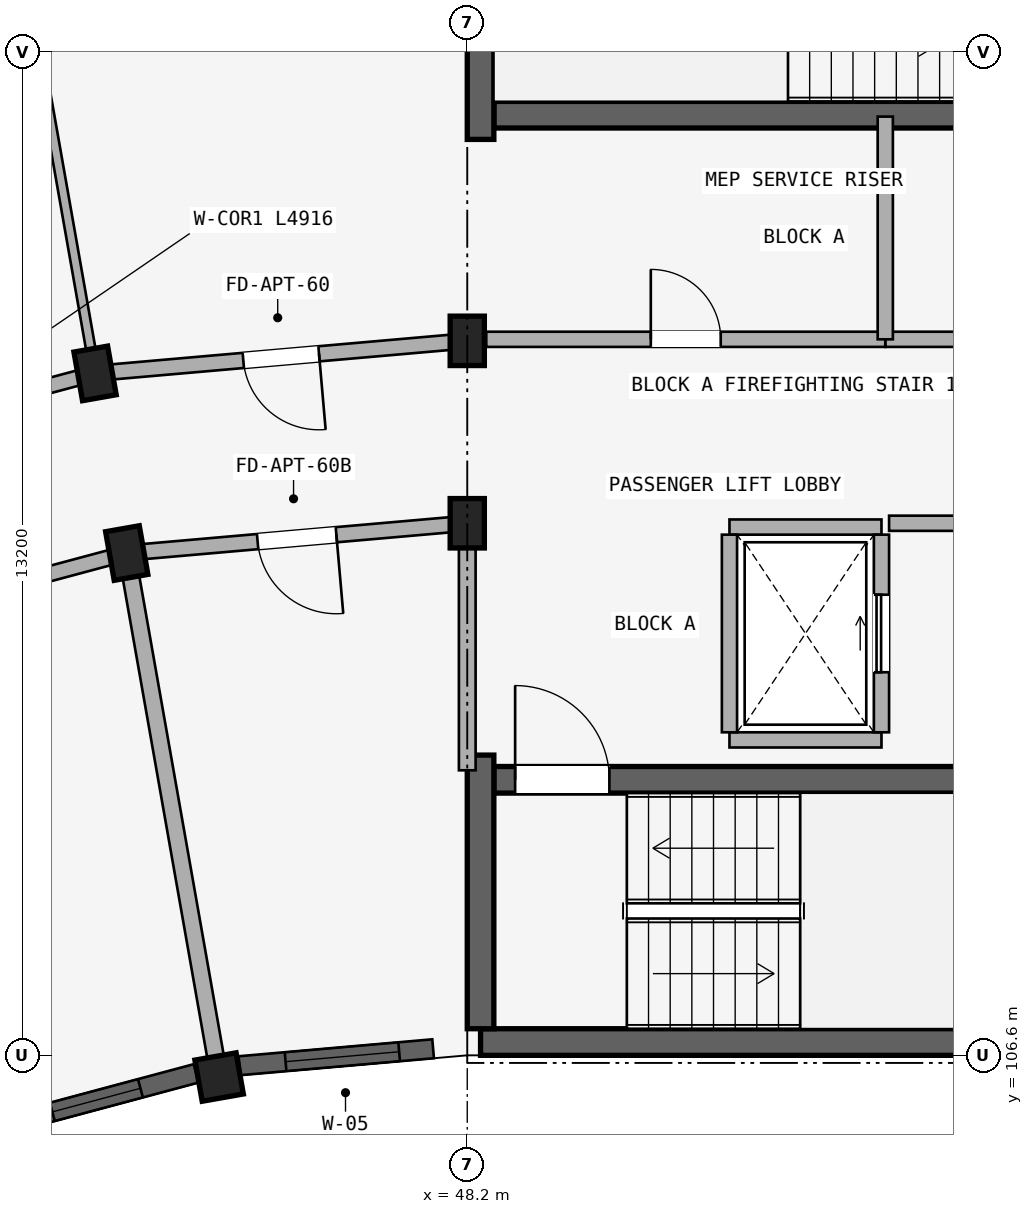
"""IFC4 building model, lengths in metres.
Left out: names, types, materials, properties, quantities, classifications, styles, units other than length and angle.
Written with IfcOpenShell. Run it as: python <this file> out.ifc"""

import sys

from ifc_helpers import new_model, si_unit, direction, frame, frame_2d, origin, origin_2d, place, context, subcontext, project, spatial, rectangle, extrude, element, fill, save


model = new_model("IFC4")
c1 = context("Model", 3, precision=1e-05, world=origin(), true_north=direction((0.0, 1.0)))
c2 = subcontext(c1, "Body", "Model", "MODEL_VIEW")
j1 = project(units=[si_unit("LENGTHUNIT", "METRE"), si_unit("PLANEANGLEUNIT", "RADIAN")], contexts=[c1])
p1 = place(None, origin())
s1 = spatial("IfcSite", under=j1, at=p1, CompositionType="ELEMENT")
p2 = place(p1, origin())
s2 = spatial("IfcBuilding", under=s1, at=p2, CompositionType="ELEMENT")
p3 = place(p2, frame((0.0, 0.0, 33.9)))
s3 = spatial("IfcBuildingStorey", under=s2, at=p3, CompositionType="ELEMENT", Elevation=33.9)
p4 = place(p3, frame((48.55, 118.975, 0.0), z_axis=(0.0, 0.0, 1.0), x_axis=(1.0, 0.0, 0.0)))
e1 = element("IfcWall", 1, at=p4, inside=s3, PredefinedType="SHEAR", context=c2, shape_type="SweptSolid", body=[
    extrude(rectangle(XDim=8.075, YDim=0.35, at=frame_2d((4.038, 0.0))), origin(), (0.0, 0.0, 1.0), 2.93),
])
p5 = place(p4, frame((6.38, 0.0, 0.0)))
e2 = element("IfcOpeningElement", 2, at=p5, cuts=e1, PredefinedType="OPENING", context=c2, shape_type="SweptSolid", body=[
    extrude(rectangle(XDim=1.24, YDim=2.15, at=frame_2d((0.62, 1.075))), frame((0.0, 0.185, 0.0), z_axis=(0.0, -1.0, 0.0), x_axis=(1.0, 0.0, 0.0)), (0.0, 0.0, 1.0), 0.37),
])
p6 = place(p3, frame((48.375, 118.65, 0.0), z_axis=(0.0, 0.0, 1.0), x_axis=(0.0, 1.0, 0.0)))
e3 = element("IfcWall", 3, at=p6, inside=s3, PredefinedType="SHEAR", context=c2, shape_type="SweptSolid", body=[
    extrude(rectangle(XDim=3.6, YDim=0.35, at=frame_2d((1.8, 0.0))), origin(), (0.0, 0.0, 1.0), 2.93),
])
p7 = place(p3, frame((48.375, 106.775, 0.0), z_axis=(0.0, 0.0, 1.0), x_axis=(1.0, 0.0, 0.0)))
e4 = element("IfcWall", 4, at=p7, inside=s3, PredefinedType="SHEAR", context=c2, shape_type="SweptSolid", body=[
    extrude(rectangle(XDim=8.25, YDim=0.35, at=frame_2d((4.125, 0.0))), origin(), (0.0, 0.0, 1.0), 2.93),
])
p8 = place(p3, frame((48.55, 110.225, 0.0), z_axis=(0.0, 0.0, 1.0), x_axis=(1.0, 0.0, 0.0)))
e5 = element("IfcWall", 5, at=p8, inside=s3, PredefinedType="SHEAR", context=c2, shape_type="SweptSolid", body=[
    extrude(rectangle(XDim=7.9, YDim=0.35, at=frame_2d((3.95, 0.0))), origin(), (0.0, 0.0, 1.0), 2.93),
])
p9 = place(p8, frame((0.28, 0.0, 0.0)))
e6 = element("IfcOpeningElement", 6, at=p9, cuts=e5, PredefinedType="OPENING", context=c2, shape_type="SweptSolid", body=[
    extrude(rectangle(XDim=1.24, YDim=2.15, at=frame_2d((0.62, 1.075))), frame((0.0, 0.185, 0.0), z_axis=(0.0, -1.0, 0.0), x_axis=(1.0, 0.0, 0.0)), (0.0, 0.0, 1.0), 0.37),
])
p10 = place(p3, frame((48.375, 106.95, 0.0), z_axis=(0.0, 0.0, 1.0), x_axis=(0.0, 1.0, 0.0)))
e7 = element("IfcWall", 7, at=p10, inside=s3, PredefinedType="SHEAR", context=c2, shape_type="SweptSolid", body=[
    extrude(rectangle(XDim=3.6, YDim=0.35, at=frame_2d((1.8, 0.0))), origin(), (0.0, 0.0, 1.0), 2.93),
])
for number, where, z_axis, x_axis in (
    (8, (48.2, 113.6, 0.0), (0.0, 0.0, 1.0), (1.0, 0.0, 0.0)),
    (9, (48.2, 116.0, 0.0), (0.0, 0.0, 1.0), (1.0, 0.0, 0.0)),
):
    element("IfcColumn", number, at=place(p3, frame(where, z_axis=z_axis, x_axis=x_axis)), inside=s3, PredefinedType="COLUMN", context=c2, shape_type="SweptSolid", body=[
        extrude(rectangle(XDim=0.45, YDim=0.65, at=origin_2d()), origin(), (0.0, 0.0, 1.0), 2.93),
    ])
p11 = place(p3, frame((44.935, 106.314, 0.0), z_axis=(0.0, 0.0, 1.0), x_axis=(0.984807753012, 0.173648177667, 0.0)))
e10 = element("IfcColumn", 10, at=p11, inside=s3, PredefinedType="COLUMN", context=c2, shape_type="SweptSolid", body=[
    extrude(rectangle(XDim=0.55, YDim=0.55, at=origin_2d()), origin(), (0.0, 0.0, 1.0), 2.93),
])
for number, where, z_axis, x_axis in (
    (11, (43.72, 113.208, 0.0), (0.0, 0.0, 1.0), (0.985, 0.174, 0.0)),
    (12, (43.303, 115.572, 0.0), (0.0, 0.0, 1.0), (0.985, 0.174, 0.0)),
):
    element("IfcColumn", number, at=place(p3, frame(where, z_axis=z_axis, x_axis=x_axis)), inside=s3, PredefinedType="COLUMN", context=c2, shape_type="SweptSolid", body=[
        extrude(rectangle(XDim=0.45, YDim=0.65, at=origin_2d()), origin(), (0.0, 0.0, 1.0), 2.93),
    ])
p12 = place(p3, frame((53.7, 116.02, 0.0), z_axis=(0.0, 0.0, 1.0), x_axis=(1.0, 0.0, 0.0)))
e13 = element("IfcWall", 13, at=p12, inside=s3, PredefinedType="STANDARD", context=c2, shape_type="SweptSolid", body=[
    extrude(rectangle(XDim=5.65, YDim=0.2, at=frame_2d((2.825, 0.0))), origin(), (0.0, 0.0, 1.0), 2.372),
])
p13 = place(p12, frame((1.923, 0.0, 0.0)))
e14 = element("IfcOpeningElement", 14, at=p13, cuts=e13, PredefinedType="OPENING", context=c2, shape_type="SweptSolid", body=[
    extrude(rectangle(XDim=1.24, YDim=2.15, at=frame_2d((0.62, 1.075))), frame((0.0, 0.11, 0.0), z_axis=(0.0, -1.0, 0.0), x_axis=(1.0, 0.0, 0.0)), (0.0, 0.0, 1.0), 0.22),
])
p14 = place(p3, frame((48.45, 116.02, 0.0), z_axis=(0.0, 0.0, 1.0), x_axis=(1.0, 0.0, 0.0)))
e15 = element("IfcWall", 15, at=p14, inside=s3, PredefinedType="STANDARD", context=c2, shape_type="SweptSolid", body=[
    extrude(rectangle(XDim=5.25, YDim=0.2, at=frame_2d((2.625, 0.0))), origin(), (0.0, 0.0, 1.0), 2.372),
])
p15 = place(p14, frame((2.165, 0.0, 0.0)))
e16 = element("IfcOpeningElement", 16, at=p15, cuts=e15, PredefinedType="OPENING", context=c2, shape_type="SweptSolid", body=[
    extrude(rectangle(XDim=0.92, YDim=2.1, at=frame_2d((0.46, 1.05))), frame((0.0, 0.11, 0.0), z_axis=(0.0, -1.0, 0.0), x_axis=(1.0, 0.0, 0.0)), (0.0, 0.0, 1.0), 0.22),
])
p16 = place(p3, frame((53.7, 116.02, 0.0), z_axis=(0.0, 0.0, 1.0), x_axis=(0.0, 1.0, 0.0)))
e17 = element("IfcWall", 17, at=p16, inside=s3, PredefinedType="STANDARD", context=c2, shape_type="SweptSolid", body=[
    extrude(rectangle(XDim=2.93, YDim=0.2, at=frame_2d((1.465, 0.0))), origin(), (0.0, 0.0, 1.0), 2.372),
])
p17 = place(p3, frame((51.65, 110.75, 0.0), z_axis=(0.0, 0.0, 1.0), x_axis=(1.0, 0.0, 0.0)))
e18 = element("IfcWall", 18, at=p17, inside=s3, PredefinedType="STANDARD", context=c2, shape_type="SweptSolid", body=[
    extrude(rectangle(XDim=2.0, YDim=0.2, at=frame_2d((1.0, 0.0))), origin(), (0.0, 0.0, 1.0), 2.93),
])
p18 = place(p3, frame((51.65, 113.55, 0.0), z_axis=(0.0, 0.0, 1.0), x_axis=(1.0, 0.0, 0.0)))
e19 = element("IfcWall", 19, at=p18, inside=s3, PredefinedType="STANDARD", context=c2, shape_type="SweptSolid", body=[
    extrude(rectangle(XDim=2.0, YDim=0.2, at=frame_2d((1.0, 0.0))), origin(), (0.0, 0.0, 1.0), 2.372),
])
p19 = place(p3, frame((51.65, 110.85, 0.0), z_axis=(0.0, 0.0, 1.0), x_axis=(0.0, 1.0, 0.0)))
e20 = element("IfcWall", 20, at=p19, inside=s3, PredefinedType="STANDARD", context=c2, shape_type="SweptSolid", body=[
    extrude(rectangle(XDim=2.6, YDim=0.2, at=frame_2d((1.3, 0.0))), origin(), (0.0, 0.0, 1.0), 2.372),
])
p20 = place(p3, frame((53.65, 110.85, 0.0), z_axis=(0.0, 0.0, 1.0), x_axis=(0.0, 1.0, 0.0)))
e21 = element("IfcWall", 21, at=p20, inside=s3, PredefinedType="STANDARD", context=c2, shape_type="SweptSolid", body=[
    extrude(rectangle(XDim=2.6, YDim=0.2, at=frame_2d((1.3, 0.0))), origin(), (0.0, 0.0, 1.0), 2.372),
])
p21 = place(p20, frame((0.79, 0.0, 0.0)))
e22 = element("IfcOpeningElement", 22, at=p21, cuts=e21, PredefinedType="OPENING", context=c2, shape_type="SweptSolid", body=[
    extrude(rectangle(XDim=1.02, YDim=2.15, at=frame_2d((0.51, 1.075))), frame((0.0, 0.11, 0.0), z_axis=(0.0, -1.0, 0.0), x_axis=(1.0, 0.0, 0.0)), (0.0, 0.0, 1.0), 0.22),
])
p22 = place(p3, frame((53.75, 113.6, 0.0), z_axis=(0.0, 0.0, 1.0), x_axis=(1.0, 0.0, 0.0)))
e23 = element("IfcWall", 23, at=p22, inside=s3, PredefinedType="STANDARD", context=c2, shape_type="SweptSolid", body=[
    extrude(rectangle(XDim=5.6, YDim=0.2, at=frame_2d((2.8, 0.0))), origin(), (0.0, 0.0, 1.0), 2.372),
])
p23 = place(p22, frame((1.91, 0.0, 0.0)))
e24 = element("IfcOpeningElement", 24, at=p23, cuts=e23, PredefinedType="OPENING", context=c2, shape_type="SweptSolid", body=[
    extrude(rectangle(XDim=1.22, YDim=2.15, at=frame_2d((0.61, 1.075))), frame((0.0, 0.11, 0.0), z_axis=(0.0, -1.0, 0.0), x_axis=(1.0, 0.0, 0.0)), (0.0, 0.0, 1.0), 0.22),
])
p24 = place(p3, frame((48.2, 113.6, 0.0), z_axis=(0.0, 0.0, 1.0), x_axis=(-0.996191949488, -0.087187153726, 0.0)))
e25 = element("IfcWall", 25, at=p24, inside=s3, PredefinedType="STANDARD", context=c2, shape_type="SweptSolid", body=[
    extrude(rectangle(XDim=4.497, YDim=0.2, at=frame_2d((2.249, 0.0))), origin(), (0.0, 0.0, 1.0), 2.372),
])
p25 = place(p24, frame((1.729, 0.0, 0.0)))
e26 = element("IfcOpeningElement", 26, at=p25, cuts=e25, PredefinedType="OPENING", context=c2, shape_type="SweptSolid", body=[
    extrude(rectangle(XDim=1.04, YDim=2.15, at=frame_2d((0.52, 1.075))), frame((0.0, 0.11, 0.0), z_axis=(0.0, -1.0, 0.0), x_axis=(1.0, 0.0, 0.0)), (0.0, 0.0, 1.0), 0.22),
])
p26 = place(p3, frame((48.2, 116.0, 0.0), z_axis=(0.0, 0.0, 1.0), x_axis=(-0.996193663584, -0.087167566415, 0.0)))
e27 = element("IfcWall", 27, at=p26, inside=s3, PredefinedType="STANDARD", context=c2, shape_type="SweptSolid", body=[
    extrude(rectangle(XDim=4.916, YDim=0.2, at=frame_2d((2.458, 0.0))), origin(), (0.0, 0.0, 1.0), 2.372),
])
p27 = place(p26, frame((1.958, 0.0, 0.0)))
e28 = element("IfcOpeningElement", 28, at=p27, cuts=e27, PredefinedType="OPENING", context=c2, shape_type="SweptSolid", body=[
    extrude(rectangle(XDim=1.0, YDim=2.15, at=frame_2d((0.5, 1.075))), frame((0.0, 0.11, 0.0), z_axis=(0.0, -1.0, 0.0), x_axis=(1.0, 0.0, 0.0)), (0.0, 0.0, 1.0), 0.22),
])
p28 = place(p3, frame((43.72, 113.208, 0.0), z_axis=(0.0, 0.0, 1.0), x_axis=(-0.965934240054, -0.258787642463, 0.0)))
e29 = element("IfcWall", 29, at=p28, inside=s3, PredefinedType="STANDARD", context=c2, shape_type="SweptSolid", body=[
    extrude(rectangle(XDim=4.497, YDim=0.2, at=frame_2d((2.249, 0.0))), origin(), (0.0, 0.0, 1.0), 2.372),
])
p29 = place(p28, frame((1.709, 0.0, 0.0)))
e30 = element("IfcOpeningElement", 30, at=p29, cuts=e29, PredefinedType="OPENING", context=c2, shape_type="SweptSolid", body=[
    extrude(rectangle(XDim=1.08, YDim=2.15, at=frame_2d((0.54, 1.075))), frame((0.0, 0.11, 0.0), z_axis=(0.0, -1.0, 0.0), x_axis=(1.0, 0.0, 0.0)), (0.0, 0.0, 1.0), 0.22),
])
p30 = place(p3, frame((43.303, 115.572, 0.0), z_axis=(0.0, 0.0, 1.0), x_axis=(-0.965930095386, -0.258803112091, 0.0)))
e31 = element("IfcWall", 31, at=p30, inside=s3, PredefinedType="STANDARD", context=c2, shape_type="SweptSolid", body=[
    extrude(rectangle(XDim=4.916, YDim=0.2, at=frame_2d((2.458, 0.0))), origin(), (0.0, 0.0, 1.0), 2.372),
])
p31 = place(p3, frame((48.2, 110.35, 0.0), z_axis=(0.0, 0.0, 1.0), x_axis=(0.0, 1.0, 0.0)))
e32 = element("IfcWall", 32, at=p31, inside=s3, PredefinedType="STANDARD", context=c2, shape_type="SweptSolid", body=[
    extrude(rectangle(XDim=3.2, YDim=0.22, at=frame_2d((1.6, 0.0))), origin(), (0.0, 0.0, 1.0), 2.372),
])
p32 = place(p3, frame((44.901, 106.511, 0.0), z_axis=(0.0, 0.0, 1.0), x_axis=(-0.173647089161, 0.984807944945, 0.0)))
e33 = element("IfcWall", 33, at=p32, inside=s3, PredefinedType="STANDARD", context=c2, shape_type="SweptSolid", body=[
    extrude(rectangle(XDim=6.75, YDim=0.22, at=frame_2d((3.375, 0.0))), origin(), (0.0, 0.0, 1.0), 2.372),
])
p33 = place(p3, frame((43.286, 115.67, 0.0), z_axis=(0.0, 0.0, 1.0), x_axis=(-0.173646216546, 0.984808098809, 0.0)))
e34 = element("IfcWall", 34, at=p33, inside=s3, PredefinedType="PARTITIONING", context=c2, shape_type="SweptSolid", body=[
    extrude(rectangle(XDim=17.42, YDim=0.125, at=frame_2d((8.71, 0.0))), origin(), (0.0, 0.0, 1.0), 2.372),
])
p34 = place(p33, frame((7.5, 0.0, 0.0)))
e35 = element("IfcOpeningElement", 35, at=p34, cuts=e34, PredefinedType="OPENING", context=c2, shape_type="SweptSolid", body=[
    extrude(rectangle(XDim=0.8, YDim=2.1, at=frame_2d((0.4, 1.05))), frame((0.0, 0.073, 0.0), z_axis=(0.0, -1.0, 0.0), x_axis=(1.0, 0.0, 0.0)), (0.0, 0.0, 1.0), 0.145),
])
p35 = place(p3, frame((47.751, 106.686, 0.0), z_axis=(0.0, 0.0, 1.0), x_axis=(-0.996188847542, -0.087222589008, 0.0)))
e36 = element("IfcWall", 36, at=p35, inside=s3, PredefinedType="STANDARD", context=c2, shape_type="SweptSolid", body=[
    extrude(rectangle(XDim=2.558, YDim=0.25, at=frame_2d((1.279, 0.0))), origin(), (0.0, 0.0, 1.0), 2.472),
])
p36 = place(p35, frame((0.448, 0.0, 0.622)))
e37 = element("IfcOpeningElement", 37, at=p36, cuts=e36, PredefinedType="OPENING", context=c2, shape_type="SweptSolid", body=[
    extrude(rectangle(XDim=1.5, YDim=1.65, at=frame_2d((0.75, 0.825))), frame((0.0, 0.135, 0.0), z_axis=(0.0, -1.0, 0.0), x_axis=(1.0, 0.0, 0.0)), (0.0, 0.0, 1.0), 0.27),
])
p37 = place(p3, frame((44.634, 106.363, 0.0), z_axis=(0.0, 0.0, 1.0), x_axis=(-0.965928818058, -0.258807879411, 0.0)))
e38 = element("IfcWall", 38, at=p37, inside=s3, PredefinedType="STANDARD", context=c2, shape_type="SweptSolid", body=[
    extrude(rectangle(XDim=2.72, YDim=0.25, at=frame_2d((1.36, 0.0))), origin(), (0.0, 0.0, 1.0), 2.472),
])
p38 = place(p37, frame((0.76, 0.0, 0.772)))
e39 = element("IfcOpeningElement", 39, at=p38, cuts=e38, PredefinedType="OPENING", context=c2, shape_type="SweptSolid", body=[
    extrude(rectangle(XDim=1.2, YDim=1.5, at=frame_2d((0.6, 0.75))), frame((0.0, 0.135, 0.0), z_axis=(0.0, -1.0, 0.0), x_axis=(1.0, 0.0, 0.0)), (0.0, 0.0, 1.0), 0.27),
])
p39 = place(p36, origin())
e40 = element("IfcWindow", 40, at=p39, inside=s3, PartitioningType="DOUBLE_PANEL_VERTICAL", PredefinedType="WINDOW", context=c2, shape_type="SweptSolid", body=[
    extrude(rectangle(XDim=1.5, YDim=1.65, at=frame_2d((0.75, 0.825))), frame((0.0, 0.03, 0.0), z_axis=(0.0, -1.0, 0.0), x_axis=(1.0, 0.0, 0.0)), (0.0, 0.0, 1.0), 0.06),
])
fill(e37, e40)
p40 = place(p38, origin())
e41 = element("IfcWindow", 41, at=p40, inside=s3, PartitioningType="SINGLE_PANEL", PredefinedType="WINDOW", context=c2, shape_type="SweptSolid", body=[
    extrude(rectangle(XDim=1.2, YDim=1.5, at=frame_2d((0.6, 0.75))), frame((0.0, 0.03, 0.0), z_axis=(0.0, -1.0, 0.0), x_axis=(1.0, 0.0, 0.0)), (0.0, 0.0, 1.0), 0.06),
])
fill(e39, e41)
p41 = place(p15, origin())
e42 = element("IfcDoor", 42, at=p41, inside=s3, OperationType="SINGLE_SWING_LEFT", PredefinedType="DOOR", context=c2, shape_type="SweptSolid", body=[
    extrude(rectangle(XDim=0.92, YDim=2.1, at=frame_2d((0.46, 1.05))), frame((0.0, 0.025, 0.0), z_axis=(0.0, -1.0, 0.0), x_axis=(1.0, 0.0, 0.0)), (0.0, 0.0, 1.0), 0.05),
])
fill(e16, e42)
p42 = place(p9, frame((1.24, 0.0, 0.0), z_axis=(0.0, 0.0, 1.0), x_axis=(-1.0, 0.0, 0.0)))
e43 = element("IfcDoor", 43, at=p42, inside=s3, OperationType="SINGLE_SWING_RIGHT", PredefinedType="DOOR", context=c2, shape_type="SweptSolid", body=[
    extrude(rectangle(XDim=1.24, YDim=2.15, at=frame_2d((0.62, 1.075))), frame((0.0, 0.025, 0.0), z_axis=(0.0, -1.0, 0.0), x_axis=(1.0, 0.0, 0.0)), (0.0, 0.0, 1.0), 0.05),
])
fill(e6, e43)
p43 = place(p21, origin())
e44 = element("IfcDoor", 44, at=p43, inside=s3, OperationType="SLIDING_TO_RIGHT", PredefinedType="DOOR", context=c2, shape_type="SweptSolid", body=[
    extrude(rectangle(XDim=1.02, YDim=2.15, at=frame_2d((0.51, 1.075))), frame((0.0, 0.025, 0.0), z_axis=(0.0, -1.0, 0.0), x_axis=(1.0, 0.0, 0.0)), (0.0, 0.0, 1.0), 0.05),
])
fill(e22, e44)
p44 = place(p27, origin())
e45 = element("IfcDoor", 45, at=p44, inside=s3, OperationType="SINGLE_SWING_LEFT", PredefinedType="DOOR", context=c2, shape_type="SweptSolid", body=[
    extrude(rectangle(XDim=1.0, YDim=2.15, at=frame_2d((0.5, 1.075))), frame((0.0, 0.025, 0.0), z_axis=(0.0, -1.0, 0.0), x_axis=(1.0, 0.0, 0.0)), (0.0, 0.0, 1.0), 0.05),
])
fill(e28, e45)
p45 = place(p25, origin())
e46 = element("IfcDoor", 46, at=p45, inside=s3, OperationType="SINGLE_SWING_LEFT", PredefinedType="DOOR", context=c2, shape_type="SweptSolid", body=[
    extrude(rectangle(XDim=1.04, YDim=2.15, at=frame_2d((0.52, 1.075))), frame((0.0, 0.025, 0.0), z_axis=(0.0, -1.0, 0.0), x_axis=(1.0, 0.0, 0.0)), (0.0, 0.0, 1.0), 0.05),
])
fill(e26, e46)
save(model, sys.argv[1])
